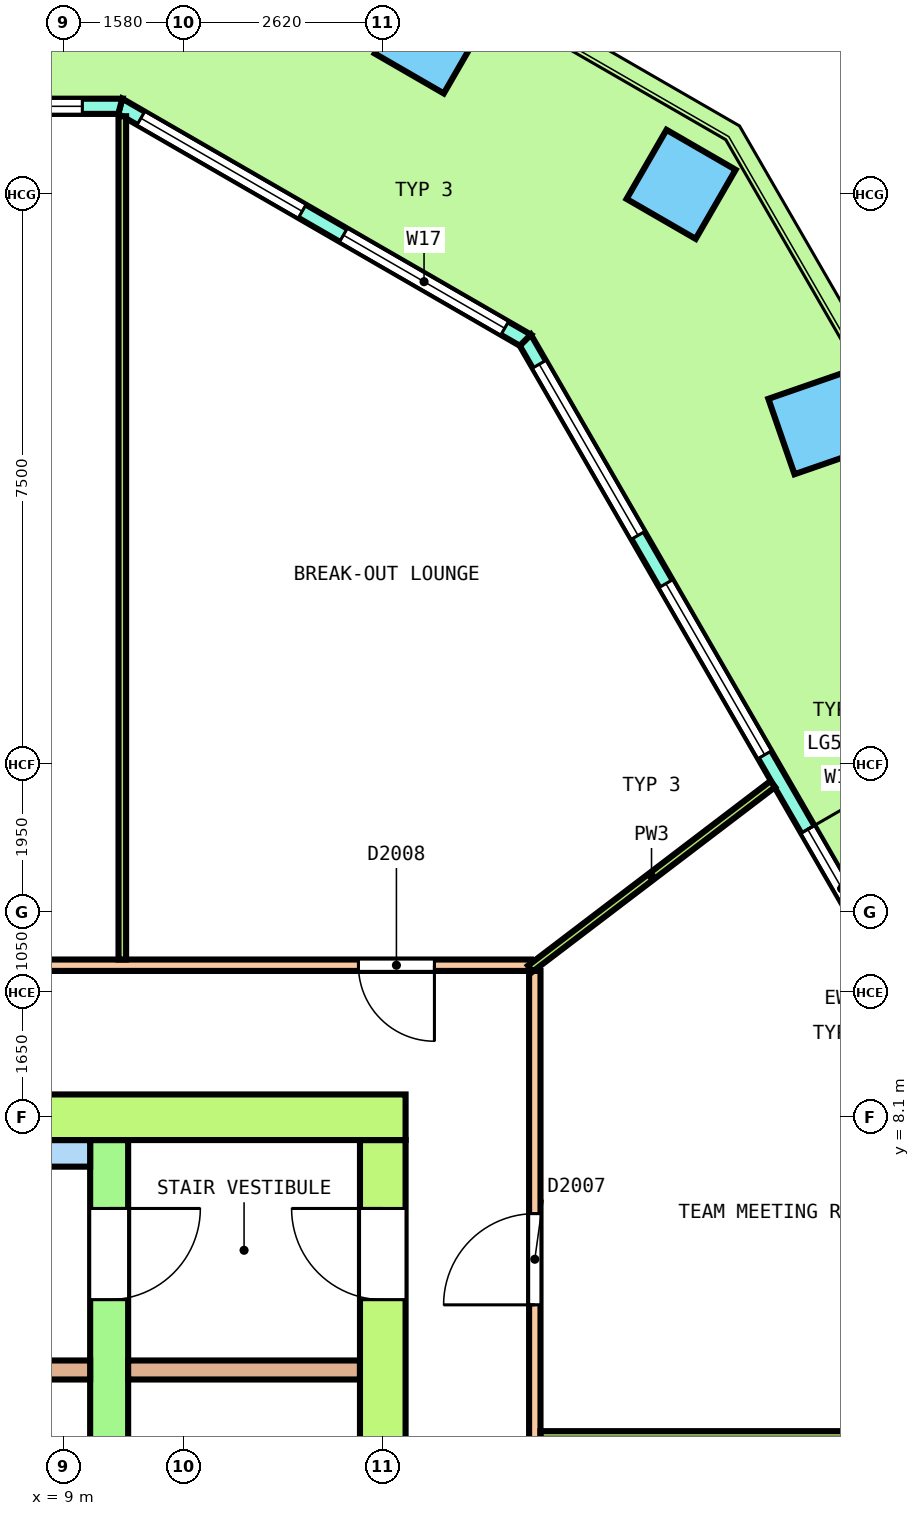
"""IFC4 building model, lengths in metres.
Left out: names, types, materials, properties, quantities, classifications, styles, units other than length and angle.
Written with IfcOpenShell. Run it as: python <this file> out.ifc"""

import sys

from ifc_helpers import new_model, si_unit, direction, frame, frame_2d, origin, origin_2d, place, context, subcontext, project, spatial, polyline, rectangle, outline, extrude, element, fill, save


model = new_model("IFC4")
c1 = context("Model", 3, precision=1e-05, world=origin(), true_north=direction((0.0, 1.0)))
c2 = subcontext(c1, "Body", "Model", "MODEL_VIEW")
j1 = project(units=[si_unit("LENGTHUNIT", "METRE"), si_unit("PLANEANGLEUNIT", "RADIAN")], contexts=[c1])
p1 = place(None, origin())
s1 = spatial("IfcSite", under=j1, at=p1, CompositionType="ELEMENT")
p2 = place(p1, origin())
s2 = spatial("IfcBuilding", under=s1, at=p2, CompositionType="ELEMENT")
p3 = place(p2, frame((0.0, 0.0, 237.4)))
s3 = spatial("IfcBuildingStorey", under=s2, at=p3, CompositionType="ELEMENT", Elevation=237.4)
p4 = place(p3, frame((18.941, 17.227, 0.0), z_axis=(0.032688717128, 0.006283720675, 0.99944582776), x_axis=(-0.499706662091, 0.866126133194, 0.010898314577)))
e1 = element("IfcColumn", 1, at=p4, inside=s3, PredefinedType="COLUMN", context=c2, shape_type="SweptSolid", body=[
    extrude(rectangle(XDim=1.05, YDim=1.05, at=origin_2d()), origin(), (0.0, 0.0, 1.0), 3.652),
])
for number, where, z_axis, x_axis in (
    (2, (17.125, 20.373, 0.0), (0.036, 0.0, 0.999), (-0.865, 0.5, 0.031)),
    (3, (13.811, 22.287, 0.0), (0.036, 0.0, 0.999), (-0.865, 0.5, 0.031)),
):
    element("IfcColumn", number, at=place(p3, frame(where, z_axis=z_axis, x_axis=x_axis)), inside=s3, PredefinedType="COLUMN", context=c2, shape_type="SweptSolid", body=[
        extrude(rectangle(XDim=1.05, YDim=1.05, at=origin_2d()), origin(), (0.0, 0.0, 1.0), 3.653),
    ])
p5 = place(p3, frame((23.406, 3.894, 0.0), z_axis=(0.0, 0.0, 1.0), x_axis=(-0.49999683882, 0.866027228885, 0.0)))
e4 = element("IfcWall", 4, at=p5, inside=s3, PredefinedType="SOLIDWALL", context=c2, shape_type="SweptSolid", body=[
    extrude(outline(polyline([(-0.027, -0.1), (1.018, -0.1), (2.062, -0.1), (3.107, -0.1), (4.152, -0.1), (5.197, -0.1), (6.242, -0.1), (7.286, -0.1), (8.331, -0.1), (9.376, -0.1), (10.42, -0.1), (11.465, -0.1), (12.51, -0.1), (13.555, -0.1), (14.6, -0.1), (15.644, -0.1), (16.689, -0.1), (16.635, 0.1), (15.597, 0.1), (14.559, 0.1), (13.521, 0.1), (12.483, 0.1), (11.445, 0.1), (10.407, 0.1), (9.369, 0.1), (8.331, 0.1), (7.293, 0.1), (6.255, 0.1), (5.217, 0.1), (4.179, 0.1), (3.141, 0.1), (2.103, 0.1), (1.065, 0.1), (0.027, 0.1), (-0.027, -0.1)])), origin(), (0.0, 0.0, 1.0), 3.7),
])
p6 = place(p5, frame((0.366, 0.0, 0.1)))
e5 = element("IfcOpeningElement", 5, at=p6, cuts=e4, PredefinedType="OPENING", context=c2, shape_type="SweptSolid", body=[
    extrude(rectangle(XDim=2.6, YDim=2.65, at=frame_2d((1.3, 1.325))), frame((0.0, 0.11, 0.0), z_axis=(0.0, -1.0, 0.0), x_axis=(1.0, 0.0, 0.0)), (0.0, 0.0, 1.0), 0.22),
])
p7 = place(p5, frame((3.699, 0.0, 0.1)))
e6 = element("IfcOpeningElement", 6, at=p7, cuts=e4, PredefinedType="OPENING", context=c2, shape_type="SweptSolid", body=[
    extrude(rectangle(XDim=2.6, YDim=2.65, at=frame_2d((1.3, 1.325))), frame((0.0, 0.11, 0.0), z_axis=(0.0, -1.0, 0.0), x_axis=(1.0, 0.0, 0.0)), (0.0, 0.0, 1.0), 0.22),
])
p8 = place(p5, frame((7.431, 0.0, 0.0)))
e7 = element("IfcOpeningElement", 7, at=p8, cuts=e4, PredefinedType="OPENING", context=c2, shape_type="SweptSolid", body=[
    extrude(rectangle(XDim=1.8, YDim=2.4, at=frame_2d((0.9, 1.2))), frame((0.0, 0.11, 0.0), z_axis=(0.0, -1.0, 0.0), x_axis=(1.0, 0.0, 0.0)), (0.0, 0.0, 1.0), 0.22),
])
p9 = place(p5, frame((7.431, 0.0, 2.55)))
e8 = element("IfcOpeningElement", 8, at=p9, cuts=e4, PredefinedType="OPENING", context=c2, shape_type="SweptSolid", body=[
    extrude(rectangle(XDim=1.8, YDim=0.2, at=frame_2d((0.9, 0.1))), frame((0.0, 0.11, 0.0), z_axis=(0.0, -1.0, 0.0), x_axis=(1.0, 0.0, 0.0)), (0.0, 0.0, 1.0), 0.22),
])
p10 = place(p5, frame((10.364, 0.0, 0.1)))
e9 = element("IfcOpeningElement", 9, at=p10, cuts=e4, PredefinedType="OPENING", context=c2, shape_type="SweptSolid", body=[
    extrude(rectangle(XDim=2.6, YDim=2.65, at=frame_2d((1.3, 1.325))), frame((0.0, 0.11, 0.0), z_axis=(0.0, -1.0, 0.0), x_axis=(1.0, 0.0, 0.0)), (0.0, 0.0, 1.0), 0.22),
])
p11 = place(p5, frame((13.696, 0.0, 0.1)))
e10 = element("IfcOpeningElement", 10, at=p11, cuts=e4, PredefinedType="OPENING", context=c2, shape_type="SweptSolid", body=[
    extrude(rectangle(XDim=2.6, YDim=2.65, at=frame_2d((1.3, 1.325))), frame((0.0, 0.11, 0.0), z_axis=(0.0, -1.0, 0.0), x_axis=(1.0, 0.0, 0.0)), (0.0, 0.0, 1.0), 0.22),
])
p12 = place(p3, frame((15.075, 18.323, 0.0), z_axis=(0.0, 0.0, 1.0), x_axis=(-0.866029647142, 0.499992650217, 0.0)))
e11 = element("IfcWall", 11, at=p12, inside=s3, PredefinedType="SOLIDWALL", context=c2, shape_type="SweptSolid", body=[
    extrude(outline(polyline([(-0.027, -0.1), (1.008, -0.1), (2.042, -0.1), (3.076, -0.1), (4.111, -0.1), (5.145, -0.1), (6.18, -0.1), (6.126, 0.1), (5.109, 0.1), (4.093, 0.1), (3.076, 0.1), (2.06, 0.1), (1.043, 0.1), (0.027, 0.1), (-0.027, -0.1)])), origin(), (0.0, 0.0, 1.0), 3.7),
])
p13 = place(p12, frame((0.313, 0.0, 0.1)))
e12 = element("IfcOpeningElement", 12, at=p13, cuts=e11, PredefinedType="OPENING", context=c2, shape_type="SweptSolid", body=[
    extrude(rectangle(XDim=2.45, YDim=2.65, at=frame_2d((1.225, 1.325))), frame((0.0, 0.11, 0.0), z_axis=(0.0, -1.0, 0.0), x_axis=(1.0, 0.0, 0.0)), (0.0, 0.0, 1.0), 0.22),
])
p14 = place(p12, frame((3.39, 0.0, 0.1)))
e13 = element("IfcOpeningElement", 13, at=p14, cuts=e11, PredefinedType="OPENING", context=c2, shape_type="SweptSolid", body=[
    extrude(rectangle(XDim=2.45, YDim=2.65, at=frame_2d((1.225, 1.325))), frame((0.0, 0.11, 0.0), z_axis=(0.0, -1.0, 0.0), x_axis=(1.0, 0.0, 0.0)), (0.0, 0.0, 1.0), 0.22),
])
p15 = place(p3, frame((9.746, 21.4, 0.0), z_axis=(0.0, 0.0, 1.0), x_axis=(-1.0, 0.0, 0.0)))
e14 = element("IfcWall", 14, at=p15, inside=s3, PredefinedType="SOLIDWALL", context=c2, shape_type="SweptSolid", body=[
    extrude(outline(polyline([(-0.027, -0.1), (1.002, -0.1), (2.031, -0.1), (3.059, -0.1), (4.088, -0.1), (5.117, -0.1), (6.146, -0.1), (7.175, -0.1), (8.203, -0.1), (9.232, -0.1), (10.261, -0.1), (11.29, -0.1), (12.318, -0.1), (13.347, -0.1), (14.376, -0.1), (15.405, -0.1), (16.433, -0.1), (17.462, -0.1), (18.491, -0.1), (19.52, -0.1), (19.466, 0.1), (18.443, 0.1), (17.42, 0.1), (16.396, 0.1), (15.373, 0.1), (14.35, 0.1), (13.327, 0.1), (12.304, 0.1), (11.281, 0.1), (10.258, 0.1), (9.235, 0.1), (8.212, 0.1), (7.188, 0.1), (6.166, 0.1), (5.142, 0.1), (4.119, 0.1), (3.096, 0.1), (2.073, 0.1), (1.05, 0.1), (0.027, 0.1), (-0.027, -0.1)])), origin(), (0.0, 0.0, 1.0), 3.7),
])
p16 = place(p15, frame((0.499, 0.0, 0.1)))
e15 = element("IfcOpeningElement", 15, at=p16, cuts=e14, PredefinedType="OPENING", context=c2, shape_type="SweptSolid", body=[
    extrude(rectangle(XDim=2.9, YDim=2.65, at=frame_2d((1.45, 1.325))), frame((0.0, 0.11, 0.0), z_axis=(0.0, -1.0, 0.0), x_axis=(1.0, 0.0, 0.0)), (0.0, 0.0, 1.0), 0.22),
])
p17 = place(p15, frame((4.398, 0.0, 0.1)))
e16 = element("IfcOpeningElement", 16, at=p17, cuts=e14, PredefinedType="OPENING", context=c2, shape_type="SweptSolid", body=[
    extrude(rectangle(XDim=2.9, YDim=2.65, at=frame_2d((1.45, 1.325))), frame((0.0, 0.11, 0.0), z_axis=(0.0, -1.0, 0.0), x_axis=(1.0, 0.0, 0.0)), (0.0, 0.0, 1.0), 0.22),
])
p18 = place(p15, frame((8.846, 0.0, 0.0)))
e17 = element("IfcOpeningElement", 17, at=p18, cuts=e14, PredefinedType="OPENING", context=c2, shape_type="SweptSolid", body=[
    extrude(rectangle(XDim=1.8, YDim=2.4, at=frame_2d((0.9, 1.2))), frame((0.0, 0.11, 0.0), z_axis=(0.0, -1.0, 0.0), x_axis=(1.0, 0.0, 0.0)), (0.0, 0.0, 1.0), 0.22),
])
p19 = place(p15, frame((8.846, 0.0, 2.55)))
e18 = element("IfcOpeningElement", 18, at=p19, cuts=e14, PredefinedType="OPENING", context=c2, shape_type="SweptSolid", body=[
    extrude(rectangle(XDim=1.8, YDim=0.2, at=frame_2d((0.9, 0.1))), frame((0.0, 0.11, 0.0), z_axis=(0.0, -1.0, 0.0), x_axis=(1.0, 0.0, 0.0)), (0.0, 0.0, 1.0), 0.22),
])
p20 = place(p15, frame((12.195, 0.0, 0.1)))
e19 = element("IfcOpeningElement", 19, at=p20, cuts=e14, PredefinedType="OPENING", context=c2, shape_type="SweptSolid", body=[
    extrude(rectangle(XDim=2.9, YDim=2.65, at=frame_2d((1.45, 1.325))), frame((0.0, 0.11, 0.0), z_axis=(0.0, -1.0, 0.0), x_axis=(1.0, 0.0, 0.0)), (0.0, 0.0, 1.0), 0.22),
])
p21 = place(p15, frame((16.094, 0.0, 0.1)))
e20 = element("IfcOpeningElement", 20, at=p21, cuts=e14, PredefinedType="OPENING", context=c2, shape_type="SweptSolid", body=[
    extrude(rectangle(XDim=2.9, YDim=2.65, at=frame_2d((1.45, 1.325))), frame((0.0, 0.11, 0.0), z_axis=(0.0, -1.0, 0.0), x_axis=(1.0, 0.0, 0.0)), (0.0, 0.0, 1.0), 0.22),
])
p22 = place(p3, frame((-13.5, 8.1, 0.0), z_axis=(0.0, 0.0, 1.0), x_axis=(1.0, 0.0, 0.0)))
e21 = element("IfcWall", 21, at=p22, inside=s3, PredefinedType="SHEAR", context=c2, shape_type="SweptSolid", body=[
    extrude(rectangle(XDim=27.0, YDim=0.6, at=frame_2d((13.5, 0.0))), origin(), (0.0, 0.0, 1.0), 3.7),
])
p23 = place(p22, frame((14.425, 0.0, 0.0)))
e22 = element("IfcOpeningElement", 22, at=p23, cuts=e21, PredefinedType="OPENING", context=c2, shape_type="SweptSolid", body=[
    extrude(rectangle(XDim=1.4, YDim=2.1, at=frame_2d((0.7, 1.05))), frame((0.0, 0.31, 0.0), z_axis=(0.0, -1.0, 0.0), x_axis=(1.0, 0.0, 0.0)), (0.0, 0.0, 1.0), 0.62),
])
p24 = place(p3, frame((13.2, -7.8, 0.0), z_axis=(0.0, 0.0, 1.0), x_axis=(0.0, 1.0, 0.0)))
e23 = element("IfcWall", 23, at=p24, inside=s3, PredefinedType="SHEAR", context=c2, shape_type="SweptSolid", body=[
    extrude(rectangle(XDim=15.6, YDim=0.6, at=frame_2d((7.8, 0.0))), origin(), (0.0, 0.0, 1.0), 3.7),
])
p25 = place(p24, frame((6.6, 0.0, 0.0)))
e24 = element("IfcOpeningElement", 24, at=p25, cuts=e23, PredefinedType="OPENING", context=c2, shape_type="SweptSolid", body=[
    extrude(rectangle(XDim=2.4, YDim=2.1, at=frame_2d((1.2, 1.05))), frame((0.0, 0.31, 0.0), z_axis=(0.0, -1.0, 0.0), x_axis=(1.0, 0.0, 0.0)), (0.0, 0.0, 1.0), 0.62),
])
p26 = place(p24, frame((13.5, 0.0, 0.0)))
e25 = element("IfcOpeningElement", 25, at=p26, cuts=e23, PredefinedType="OPENING", context=c2, shape_type="SweptSolid", body=[
    extrude(rectangle(XDim=1.2, YDim=2.1, at=frame_2d((0.6, 1.05))), frame((0.0, 0.31, 0.0), z_axis=(0.0, -1.0, 0.0), x_axis=(1.0, 0.0, 0.0)), (0.0, 0.0, 1.0), 0.62),
])
p27 = place(p24, frame((1.0, 0.0, 0.0)))
e26 = element("IfcOpeningElement", 26, at=p27, cuts=e23, PredefinedType="OPENING", context=c2, shape_type="SweptSolid", body=[
    extrude(rectangle(XDim=1.0, YDim=2.1, at=frame_2d((0.5, 1.05))), frame((0.0, 0.31, 0.0), z_axis=(0.0, -1.0, 0.0), x_axis=(1.0, 0.0, 0.0)), (0.0, 0.0, 1.0), 0.62),
])
p28 = place(p3, frame((9.6, -7.8, 0.0), z_axis=(0.0, 0.0, 1.0), x_axis=(0.0, 1.0, 0.0)))
e27 = element("IfcWall", 27, at=p28, inside=s3, PredefinedType="SHEAR", context=c2, shape_type="SweptSolid", body=[
    extrude(rectangle(XDim=15.6, YDim=0.5, at=frame_2d((7.8, 0.0))), origin(), (0.0, 0.0, 1.0), 3.7),
])
p29 = place(p28, frame((6.6, 0.0, 0.0)))
e28 = element("IfcOpeningElement", 28, at=p29, cuts=e27, PredefinedType="OPENING", context=c2, shape_type="SweptSolid", body=[
    extrude(rectangle(XDim=2.4, YDim=2.1, at=frame_2d((1.2, 1.05))), frame((0.0, 0.26, 0.0), z_axis=(0.0, -1.0, 0.0), x_axis=(1.0, 0.0, 0.0)), (0.0, 0.0, 1.0), 0.52),
])
p30 = place(p28, frame((13.5, 0.0, 0.0)))
e29 = element("IfcOpeningElement", 29, at=p30, cuts=e27, PredefinedType="OPENING", context=c2, shape_type="SweptSolid", body=[
    extrude(rectangle(XDim=1.2, YDim=2.1, at=frame_2d((0.6, 1.05))), frame((0.0, 0.26, 0.0), z_axis=(0.0, -1.0, 0.0), x_axis=(1.0, 0.0, 0.0)), (0.0, 0.0, 1.0), 0.52),
])
p31 = place(p28, frame((1.0, 0.0, 0.0)))
e30 = element("IfcOpeningElement", 30, at=p31, cuts=e27, PredefinedType="OPENING", context=c2, shape_type="SweptSolid", body=[
    extrude(rectangle(XDim=1.0, YDim=2.1, at=frame_2d((0.5, 1.05))), frame((0.0, 0.26, 0.0), z_axis=(0.0, -1.0, 0.0), x_axis=(1.0, 0.0, 0.0)), (0.0, 0.0, 1.0), 0.52),
])
p32 = place(p3, frame((-9.35, 4.775, 0.0), z_axis=(0.0, 0.0, 1.0), x_axis=(1.0, 0.0, 0.0)))
e31 = element("IfcWall", 31, at=p32, inside=s3, PredefinedType="SOLIDWALL", context=c2, shape_type="SweptSolid", body=[
    extrude(rectangle(XDim=18.7, YDim=0.25, at=frame_2d((9.35, 0.0))), origin(), (0.0, 0.0, 1.0), 3.7),
])
p33 = place(p3, frame((9.85, 4.775, 0.0), z_axis=(0.0, 0.0, 1.0), x_axis=(1.0, 0.0, 0.0)))
e32 = element("IfcWall", 32, at=p33, inside=s3, PredefinedType="SOLIDWALL", context=c2, shape_type="SweptSolid", body=[
    extrude(rectangle(XDim=3.05, YDim=0.25, at=frame_2d((1.525, 0.0))), origin(), (0.0, 0.0, 1.0), 3.7),
])
p34 = place(p3, frame((3.55, 7.625, 0.0), z_axis=(0.0, 0.0, 1.0), x_axis=(1.0, 0.0, 0.0)))
e33 = element("IfcWall", 33, at=p34, inside=s3, PredefinedType="SOLIDWALL", context=c2, shape_type="SweptSolid", body=[
    extrude(rectangle(XDim=5.8, YDim=0.35, at=frame_2d((2.9, 0.0))), origin(), (0.0, 0.0, 1.0), 3.7),
])
p35 = place(p3, frame((15.2, -7.075, 0.0), z_axis=(0.0, 0.0, 1.0), x_axis=(0.0, 1.0, 0.0)))
e34 = element("IfcWall", 34, at=p35, inside=s3, PredefinedType="PARTITIONING", context=c2, shape_type="SweptSolid", body=[
    extrude(rectangle(XDim=17.1, YDim=0.15, at=frame_2d((8.55, 0.0))), origin(), (0.0, 0.0, 1.0), 2.8),
])
p36 = place(p35, frame((7.292, 0.0, 0.0)))
e35 = element("IfcOpeningElement", 35, at=p36, cuts=e34, PredefinedType="OPENING", context=c2, shape_type="SweptSolid", body=[
    extrude(rectangle(XDim=1.2, YDim=2.1, at=frame_2d((0.6, 1.05))), frame((0.0, 0.085, 0.0), z_axis=(0.0, -1.0, 0.0), x_axis=(1.0, 0.0, 0.0)), (0.0, 0.0, 1.0), 0.17),
])
p37 = place(p35, frame((12.707, 0.0, 0.0)))
e36 = element("IfcOpeningElement", 36, at=p37, cuts=e34, PredefinedType="OPENING", context=c2, shape_type="SweptSolid", body=[
    extrude(rectangle(XDim=1.2, YDim=2.1, at=frame_2d((0.6, 1.05))), frame((0.0, 0.085, 0.0), z_axis=(0.0, -1.0, 0.0), x_axis=(1.0, 0.0, 0.0)), (0.0, 0.0, 1.0), 0.17),
])
p38 = place(p35, frame((2.648, 0.0, 0.0)))
e37 = element("IfcOpeningElement", 37, at=p38, cuts=e34, PredefinedType="OPENING", context=c2, shape_type="SweptSolid", body=[
    extrude(rectangle(XDim=1.0, YDim=2.1, at=frame_2d((0.5, 1.05))), frame((0.0, 0.085, 0.0), z_axis=(0.0, -1.0, 0.0), x_axis=(1.0, 0.0, 0.0)), (0.0, 0.0, 1.0), 0.17),
])
p39 = place(p3, frame((-15.125, 10.1, 0.0), z_axis=(0.0, 0.0, 1.0), x_axis=(1.0, 0.0, 0.0)))
e38 = element("IfcWall", 38, at=p39, inside=s3, PredefinedType="PARTITIONING", context=c2, shape_type="SweptSolid", body=[
    extrude(rectangle(XDim=30.275, YDim=0.15, at=frame_2d((15.137, 0.0))), origin(), (0.0, 0.0, 1.0), 2.8),
])
p40 = place(p39, frame((28.004, 0.0, 0.0)))
e39 = element("IfcOpeningElement", 39, at=p40, cuts=e38, PredefinedType="OPENING", context=c2, shape_type="SweptSolid", body=[
    extrude(rectangle(XDim=1.0, YDim=2.1, at=frame_2d((0.5, 1.05))), frame((0.0, 0.085, 0.0), z_axis=(0.0, -1.0, 0.0), x_axis=(1.0, 0.0, 0.0)), (0.0, 0.0, 1.0), 0.17),
])
p41 = place(p39, frame((21.041, 0.0, 0.0)))
e40 = element("IfcOpeningElement", 40, at=p41, cuts=e38, PredefinedType="OPENING", context=c2, shape_type="SweptSolid", body=[
    extrude(rectangle(XDim=1.0, YDim=2.1, at=frame_2d((0.5, 1.05))), frame((0.0, 0.085, 0.0), z_axis=(0.0, -1.0, 0.0), x_axis=(1.0, 0.0, 0.0)), (0.0, 0.0, 1.0), 0.17),
])
p42 = place(p39, frame((4.28, 0.0, 0.0)))
e41 = element("IfcOpeningElement", 41, at=p42, cuts=e38, PredefinedType="OPENING", context=c2, shape_type="SweptSolid", body=[
    extrude(rectangle(XDim=1.2, YDim=2.1, at=frame_2d((0.6, 1.05))), frame((0.0, 0.085, 0.0), z_axis=(0.0, -1.0, 0.0), x_axis=(1.0, 0.0, 0.0)), (0.0, 0.0, 1.0), 0.17),
])
p43 = place(p3, frame((15.275, 3.92, 0.0), z_axis=(0.0, 0.0, 1.0), x_axis=(1.0, 0.0, 0.0)))
e42 = element("IfcWall", 42, at=p43, inside=s3, PredefinedType="PARTITIONING", context=c2, shape_type="SweptSolid", body=[
    extrude(rectangle(XDim=8.0, YDim=0.1, at=frame_2d((4.0, 0.0))), origin(), (0.0, 0.0, 1.0), 2.8),
])
p44 = place(p3, frame((15.14, 10.055, 0.0), z_axis=(0.0, 0.0, 1.0), x_axis=(0.795624550045, 0.605790042313, 0.0)))
e43 = element("IfcWall", 43, at=p44, inside=s3, PredefinedType="PARTITIONING", context=c2, shape_type="SweptSolid", body=[
    extrude(rectangle(XDim=4.01, YDim=0.1, at=frame_2d((2.005, 0.0))), origin(), (0.0, 0.0, 1.0), 2.8),
])
p45 = place(p3, frame((9.773, 10.175, 0.0), z_axis=(0.0, 0.0, 1.0), x_axis=(0.0, 1.0, 0.0)))
e44 = element("IfcWall", 44, at=p45, inside=s3, PredefinedType="PARTITIONING", context=c2, shape_type="SweptSolid", body=[
    extrude(rectangle(XDim=11.094, YDim=0.1, at=frame_2d((5.547, 0.0))), origin(), (0.0, 0.0, 1.0), 2.8),
])
p46 = place(p8, origin())
e45 = element("IfcDoor", 45, at=p46, inside=s3, OperationType="DOUBLE_DOOR_SINGLE_SWING", PredefinedType="DOOR", context=c2, shape_type="SweptSolid", body=[
    extrude(rectangle(XDim=1.8, YDim=2.4, at=frame_2d((0.9, 1.2))), frame((0.0, 0.025, 0.0), z_axis=(0.0, -1.0, 0.0), x_axis=(1.0, 0.0, 0.0)), (0.0, 0.0, 1.0), 0.05),
])
fill(e7, e45)
p47 = place(p9, origin())
e46 = element("IfcWindow", 46, at=p47, inside=s3, PartitioningType="SINGLE_PANEL", PredefinedType="WINDOW", context=c2, shape_type="SweptSolid", body=[
    extrude(rectangle(XDim=1.8, YDim=0.2, at=frame_2d((0.9, 0.1))), frame((0.0, 0.03, 0.0), z_axis=(0.0, -1.0, 0.0), x_axis=(1.0, 0.0, 0.0)), (0.0, 0.0, 1.0), 0.06),
])
fill(e8, e46)
p48 = place(p10, origin())
e47 = element("IfcWindow", 47, at=p48, inside=s3, PartitioningType="SINGLE_PANEL", PredefinedType="WINDOW", context=c2, shape_type="SweptSolid", body=[
    extrude(rectangle(XDim=2.6, YDim=2.65, at=frame_2d((1.3, 1.325))), frame((0.0, 0.03, 0.0), z_axis=(0.0, -1.0, 0.0), x_axis=(1.0, 0.0, 0.0)), (0.0, 0.0, 1.0), 0.06),
])
fill(e9, e47)
p49 = place(p11, origin())
e48 = element("IfcWindow", 48, at=p49, inside=s3, PartitioningType="SINGLE_PANEL", PredefinedType="WINDOW", context=c2, shape_type="SweptSolid", body=[
    extrude(rectangle(XDim=2.6, YDim=2.65, at=frame_2d((1.3, 1.325))), frame((0.0, 0.03, 0.0), z_axis=(0.0, -1.0, 0.0), x_axis=(1.0, 0.0, 0.0)), (0.0, 0.0, 1.0), 0.06),
])
fill(e10, e48)
p50 = place(p13, origin())
e49 = element("IfcWindow", 49, at=p50, inside=s3, PartitioningType="SINGLE_PANEL", PredefinedType="WINDOW", context=c2, shape_type="SweptSolid", body=[
    extrude(rectangle(XDim=2.45, YDim=2.65, at=frame_2d((1.225, 1.325))), frame((0.0, 0.03, 0.0), z_axis=(0.0, -1.0, 0.0), x_axis=(1.0, 0.0, 0.0)), (0.0, 0.0, 1.0), 0.06),
])
fill(e12, e49)
p51 = place(p14, origin())
e50 = element("IfcWindow", 50, at=p51, inside=s3, PartitioningType="SINGLE_PANEL", PredefinedType="WINDOW", context=c2, shape_type="SweptSolid", body=[
    extrude(rectangle(XDim=2.45, YDim=2.65, at=frame_2d((1.225, 1.325))), frame((0.0, 0.03, 0.0), z_axis=(0.0, -1.0, 0.0), x_axis=(1.0, 0.0, 0.0)), (0.0, 0.0, 1.0), 0.06),
])
fill(e13, e50)
p52 = place(p16, origin())
e51 = element("IfcWindow", 51, at=p52, inside=s3, PartitioningType="SINGLE_PANEL", PredefinedType="WINDOW", context=c2, shape_type="SweptSolid", body=[
    extrude(rectangle(XDim=2.9, YDim=2.65, at=frame_2d((1.45, 1.325))), frame((0.0, 0.03, 0.0), z_axis=(0.0, -1.0, 0.0), x_axis=(1.0, 0.0, 0.0)), (0.0, 0.0, 1.0), 0.06),
])
fill(e15, e51)
p53 = place(p30, origin())
e52 = element("IfcDoor", 52, at=p53, inside=s3, OperationType="SINGLE_SWING_RIGHT", PredefinedType="DOOR", context=c2, shape_type="SweptSolid", body=[
    extrude(rectangle(XDim=1.2, YDim=2.1, at=frame_2d((0.6, 1.05))), frame((0.0, 0.2, 0.0), z_axis=(0.0, -1.0, 0.0), x_axis=(1.0, 0.0, 0.0)), (0.0, 0.0, 1.0), 0.4),
])
fill(e29, e52)
p54 = place(p26, origin())
e53 = element("IfcDoor", 53, at=p54, inside=s3, OperationType="SINGLE_SWING_LEFT", PredefinedType="DOOR", context=c2, shape_type="SweptSolid", body=[
    extrude(rectangle(XDim=1.2, YDim=2.1, at=frame_2d((0.6, 1.05))), frame((0.0, 0.25, 0.0), z_axis=(0.0, -1.0, 0.0), x_axis=(1.0, 0.0, 0.0)), (0.0, 0.0, 1.0), 0.5),
])
fill(e25, e53)
p55 = place(p37, origin())
e54 = element("IfcDoor", 54, at=p55, inside=s3, OperationType="DOUBLE_DOOR_SINGLE_SWING", PredefinedType="DOOR", context=c2, shape_type="SweptSolid", body=[
    extrude(rectangle(XDim=1.2, YDim=2.1, at=frame_2d((0.6, 1.05))), frame((0.0, 0.025, 0.0), z_axis=(0.0, -1.0, 0.0), x_axis=(1.0, 0.0, 0.0)), (0.0, 0.0, 1.0), 0.05),
])
fill(e36, e54)
p56 = place(p40, origin())
e55 = element("IfcDoor", 55, at=p56, inside=s3, OperationType="SINGLE_SWING_LEFT", PredefinedType="DOOR", context=c2, shape_type="SweptSolid", body=[
    extrude(rectangle(XDim=1.0, YDim=2.1, at=frame_2d((0.5, 1.05))), frame((0.0, 0.025, 0.0), z_axis=(0.0, -1.0, 0.0), x_axis=(1.0, 0.0, 0.0)), (0.0, 0.0, 1.0), 0.05),
])
fill(e39, e55)
save(model, sys.argv[1])
